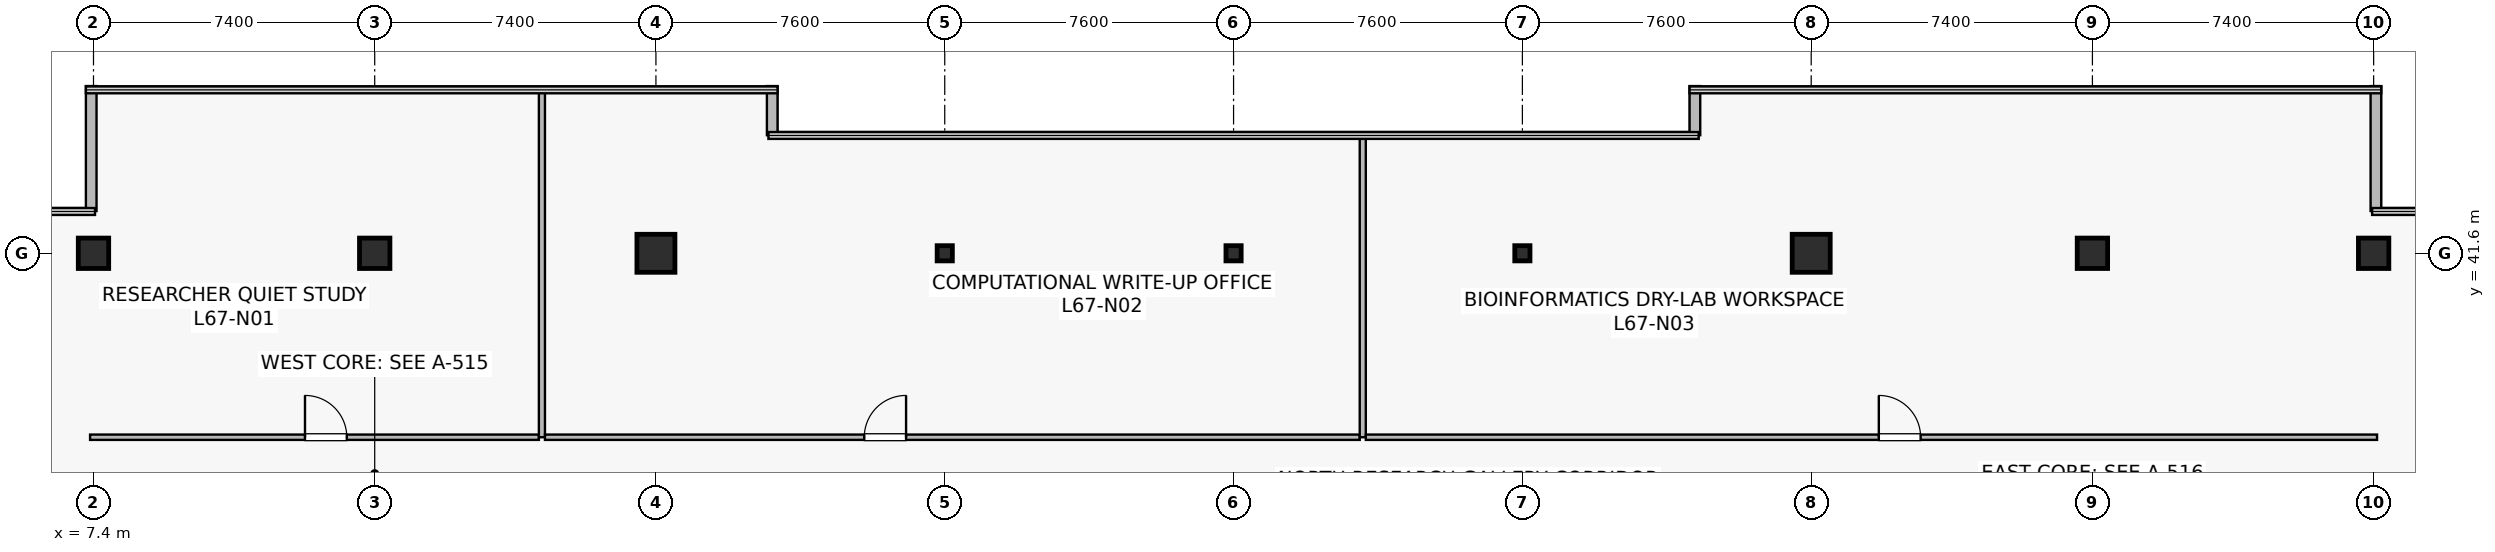
"""IFC4 building model, lengths in metres.
Left out: names, types, materials, properties, quantities, classifications, styles, units other than length and angle.
Written with IfcOpenShell. Run it as: python <this file> out.ifc"""

import sys

from ifc_helpers import new_model, si_unit, direction, frame, frame_2d, origin, origin_2d, place, context, subcontext, project, spatial, rectangle, hollow_rectangle, extrude, source, transform, mapped, element, fill, save


model = new_model("IFC4")
c1 = context("Model", 3, precision=1e-05, world=origin(), true_north=direction((0.0, 1.0)))
c2 = subcontext(c1, "Body", "Model", "MODEL_VIEW")
j1 = project(units=[si_unit("LENGTHUNIT", "METRE"), si_unit("PLANEANGLEUNIT", "RADIAN")], contexts=[c1])
p1 = place(None, origin())
s1 = spatial("IfcSite", under=j1, at=p1, CompositionType="ELEMENT")
p2 = place(p1, origin())
s2 = spatial("IfcBuilding", under=s1, at=p2, CompositionType="ELEMENT")
p3 = place(p2, frame((0.0, 0.0, 279.3)))
s3 = spatial("IfcBuildingStorey", under=s2, at=p3, CompositionType="ELEMENT", Elevation=279.3)
m1 = source(origin(), c2, "Body", "SweptSolid", [
    extrude(rectangle(XDim=0.8, YDim=0.8, at=origin_2d()), origin(), (0.0, 0.0, 1.0), 4.1),
])
p4 = place(p3, frame((14.8, 41.6, 0.0), z_axis=(0.0, 0.0, 1.0), x_axis=(1.0, 0.0, 0.0)))
e1 = element("IfcColumn", 1, at=p4, inside=s3, PredefinedType="COLUMN", context=c2, shape_type="MappedRepresentation", body=[
    mapped(m1, transform((0.0, 0.0, 0.0), scale=1.0)),
])
m2 = source(origin(), c2, "Body", "SweptSolid", [
    extrude(rectangle(XDim=1.0, YDim=1.0, at=origin_2d()), origin(), (0.0, 0.0, 1.0), 4.1),
])
for number, where, z_axis, x_axis in (
    (2, (22.2, 41.6, 0.0), (0.0, 0.0, 1.0), (1.0, 0.0, 0.0)),
    (3, (52.6, 41.6, 0.0), (0.0, 0.0, 1.0), (1.0, 0.0, 0.0)),
):
    element("IfcColumn", number, at=place(p3, frame(where, z_axis=z_axis, x_axis=x_axis)), inside=s3, PredefinedType="COLUMN", context=c2, shape_type="MappedRepresentation", body=[
        mapped(m2, transform((0.0, 0.0, 0.0), scale=1.0)),
    ])
for number, where, z_axis, x_axis in (
    (4, (60.0, 41.6, 0.0), (0.0, 0.0, 1.0), (1.0, 0.0, 0.0)),
    (5, (7.4, 41.6, 0.0), (0.0, 0.0, 1.0), (1.0, 0.0, 0.0)),
    (6, (67.4, 41.6, 0.0), (0.0, 0.0, 1.0), (1.0, 0.0, 0.0)),
):
    element("IfcColumn", number, at=place(p3, frame(where, z_axis=z_axis, x_axis=x_axis)), inside=s3, PredefinedType="COLUMN", context=c2, shape_type="MappedRepresentation", body=[
        mapped(m1, transform((0.0, 0.0, 0.0), scale=1.0)),
    ])
m3 = source(origin(), c2, "Body", "SweptSolid", [
    extrude(hollow_rectangle(XDim=0.4, YDim=0.4, WallThickness=0.019, at=origin_2d()), origin(), (0.0, 0.0, 1.0), 4.1),
])
for number, where, z_axis, x_axis in (
    (7, (29.8, 41.6, 0.0), (0.0, 0.0, 1.0), (1.0, 0.0, 0.0)),
    (8, (37.4, 41.6, 0.0), (0.0, 0.0, 1.0), (1.0, 0.0, 0.0)),
    (9, (45.0, 41.6, 0.0), (0.0, 0.0, 1.0), (1.0, 0.0, 0.0)),
):
    element("IfcColumn", number, at=place(p3, frame(where, z_axis=z_axis, x_axis=x_axis)), inside=s3, PredefinedType="COLUMN", context=c2, shape_type="MappedRepresentation", body=[
        mapped(m3, transform((0.0, 0.0, 0.0), scale=1.0)),
    ])
p5 = place(p3, frame((67.46, 42.712, 0.0), z_axis=(0.0, 0.0, 1.0), x_axis=(0.0, 1.0, 0.0)))
e10 = element("IfcWall", 10, at=p5, inside=s3, PredefinedType="STANDARD", context=c2, shape_type="SweptSolid", body=[
    extrude(rectangle(XDim=3.288, YDim=0.28, at=frame_2d((1.644, 0.0))), origin(), (0.0, 0.0, 1.0), 3.8),
])
for number, where, z_axis, x_axis in (
    (11, (49.54, 46.0, 0.0), (0.0, 0.0, 1.0), (0.0, -1.0, 0.0)),
    (12, (25.26, 44.707, 0.0), (0.0, 0.0, 1.0), (0.0, 1.0, 0.0)),
):
    element("IfcWall", number, at=place(p3, frame(where, z_axis=z_axis, x_axis=x_axis)), inside=s3, PredefinedType="STANDARD", context=c2, shape_type="SweptSolid", body=[
        extrude(rectangle(XDim=1.293, YDim=0.28, at=frame_2d((0.646, 0.0))), origin(), (0.0, 0.0, 1.0), 3.8),
    ])
p6 = place(p3, frame((7.34, 46.0, 0.0), z_axis=(0.0, 0.0, 1.0), x_axis=(0.0, -1.0, 0.0)))
e13 = element("IfcWall", 13, at=p6, inside=s3, PredefinedType="STANDARD", context=c2, shape_type="SweptSolid", body=[
    extrude(rectangle(XDim=3.288, YDim=0.28, at=frame_2d((1.644, 0.0))), origin(), (0.0, 0.0, 1.0), 3.8),
])
p7 = place(p3, frame((7.31, 36.76, 0.0), z_axis=(0.0, 0.0, 1.0), x_axis=(1.0, 0.0, 0.0)))
e14 = element("IfcWall", 14, at=p7, inside=s3, PredefinedType="PARTITIONING", context=c2, shape_type="SweptSolid", body=[
    extrude(rectangle(XDim=11.81, YDim=0.14, at=frame_2d((5.905, 0.0))), origin(), (0.0, 0.0, 1.0), 3.197),
])
p8 = place(p7, frame((5.655, 0.0, 0.0)))
e15 = element("IfcOpeningElement", 15, at=p8, cuts=e14, PredefinedType="OPENING", context=c2, shape_type="SweptSolid", body=[
    extrude(rectangle(XDim=1.1, YDim=2.18, at=frame_2d((0.55, 1.09))), frame((0.0, 0.08, 0.0), z_axis=(0.0, -1.0, 0.0), x_axis=(1.0, 0.0, 0.0)), (0.0, 0.0, 1.0), 0.16),
])
p9 = place(p3, frame((19.2, 36.76, 0.0), z_axis=(0.0, 0.0, 1.0), x_axis=(0.0, 1.0, 0.0)))
e16 = element("IfcWall", 16, at=p9, inside=s3, PredefinedType="PARTITIONING", context=c2, shape_type="SweptSolid", body=[
    extrude(rectangle(XDim=9.13, YDim=0.16, at=frame_2d((4.565, 0.0))), origin(), (0.0, 0.0, 1.0), 3.135),
])
p10 = place(p3, frame((19.28, 36.76, 0.0), z_axis=(0.0, 0.0, 1.0), x_axis=(1.0, 0.0, 0.0)))
e17 = element("IfcWall", 17, at=p10, inside=s3, PredefinedType="PARTITIONING", context=c2, shape_type="SweptSolid", body=[
    extrude(rectangle(XDim=21.44, YDim=0.14, at=frame_2d((10.72, 0.0))), origin(), (0.0, 0.0, 1.0), 3.197),
])
p11 = place(p10, frame((8.402, 0.0, 0.0)))
e18 = element("IfcOpeningElement", 18, at=p11, cuts=e17, PredefinedType="OPENING", context=c2, shape_type="SweptSolid", body=[
    extrude(rectangle(XDim=1.1, YDim=2.18, at=frame_2d((0.55, 1.09))), frame((0.0, 0.08, 0.0), z_axis=(0.0, -1.0, 0.0), x_axis=(1.0, 0.0, 0.0)), (0.0, 0.0, 1.0), 0.16),
])
p12 = place(p3, frame((40.8, 36.76, 0.0), z_axis=(0.0, 0.0, 1.0), x_axis=(0.0, 1.0, 0.0)))
e19 = element("IfcWall", 19, at=p12, inside=s3, PredefinedType="PARTITIONING", context=c2, shape_type="SweptSolid", body=[
    extrude(rectangle(XDim=7.93, YDim=0.16, at=frame_2d((3.965, 0.0))), origin(), (0.0, 0.0, 1.0), 3.135),
])
p13 = place(p3, frame((40.88, 36.76, 0.0), z_axis=(0.0, 0.0, 1.0), x_axis=(1.0, 0.0, 0.0)))
e20 = element("IfcWall", 20, at=p13, inside=s3, PredefinedType="PARTITIONING", context=c2, shape_type="SweptSolid", body=[
    extrude(rectangle(XDim=26.61, YDim=0.14, at=frame_2d((13.305, 0.0))), origin(), (0.0, 0.0, 1.0), 3.197),
])
p14 = place(p13, frame((13.499, 0.0, 0.0)))
e21 = element("IfcOpeningElement", 21, at=p14, cuts=e20, PredefinedType="OPENING", context=c2, shape_type="SweptSolid", body=[
    extrude(rectangle(XDim=1.1, YDim=2.18, at=frame_2d((0.55, 1.09))), frame((0.0, 0.08, 0.0), z_axis=(0.0, -1.0, 0.0), x_axis=(1.0, 0.0, 0.0)), (0.0, 0.0, 1.0), 0.16),
])
m4 = source(origin(), c2, "Body", "SweptSolid", [
    extrude(rectangle(XDim=1.1, YDim=2.18, at=frame_2d((0.55, 1.09))), frame((0.0, 0.025, 0.0), z_axis=(0.0, -1.0, 0.0), x_axis=(1.0, 0.0, 0.0)), (0.0, 0.0, 1.0), 0.05),
])
p15 = place(p8, origin())
e22 = element("IfcDoor", 22, at=p15, inside=s3, OperationType="SINGLE_SWING_LEFT", PredefinedType="DOOR", context=c2, shape_type="MappedRepresentation", body=[
    mapped(m4, transform((0.0, 0.0, 0.0), scale=1.0)),
])
fill(e15, e22)
p16 = place(p11, origin())
e23 = element("IfcDoor", 23, at=p16, inside=s3, OperationType="SINGLE_SWING_RIGHT", PredefinedType="DOOR", context=c2, shape_type="MappedRepresentation", body=[
    mapped(m4, transform((0.0, 0.0, 0.0), scale=1.0)),
])
fill(e18, e23)
p17 = place(p14, origin())
e24 = element("IfcDoor", 24, at=p17, inside=s3, OperationType="SINGLE_SWING_LEFT", PredefinedType="DOOR", context=c2, shape_type="MappedRepresentation", body=[
    mapped(m4, transform((0.0, 0.0, 0.0), scale=1.0)),
])
fill(e21, e24)
save(model, sys.argv[1])
